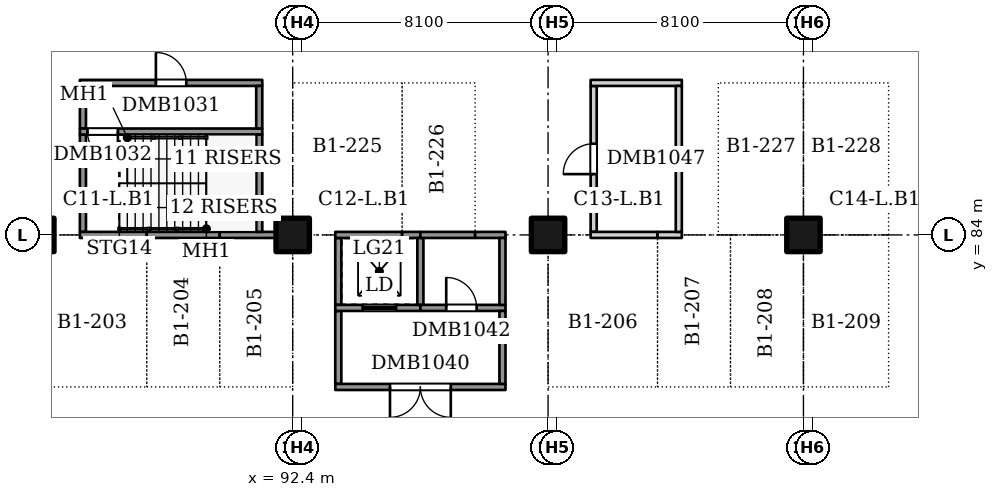
"""IFC4 building model, lengths in metres.
Left out: names, types, materials, properties, quantities, classifications, styles, units other than length and angle.
Written with IfcOpenShell. Run it as: python <this file> out.ifc"""

import sys

from ifc_helpers import new_model, si_unit, direction, frame, frame_2d, origin, origin_2d, place, context, subcontext, project, spatial, rectangle, extrude, element, fill, save


model = new_model("IFC4")
c1 = context("Model", 3, precision=1e-05, world=origin(), true_north=direction((0.0, 1.0)))
c2 = subcontext(c1, "Body", "Model", "MODEL_VIEW")
j1 = project(units=[si_unit("LENGTHUNIT", "METRE"), si_unit("PLANEANGLEUNIT", "RADIAN")], contexts=[c1])
p1 = place(None, origin())
s1 = spatial("IfcSite", under=j1, at=p1, CompositionType="ELEMENT")
p2 = place(p1, origin())
s2 = spatial("IfcBuilding", under=s1, at=p2, CompositionType="ELEMENT")
p3 = place(p2, frame((0.0, 0.0, -4.0)))
s3 = spatial("IfcBuildingStorey", under=s2, at=p3, CompositionType="ELEMENT", Elevation=-4.0)
for number, where, z_axis, x_axis in (
    (1, (84.0, 84.0, 0.0), (0.0, 0.0, 1.0), (1.0, 0.0, 0.0)),
    (2, (92.4, 84.0, 0.0), (0.0, 0.0, 1.0), (1.0, 0.0, 0.0)),
    (3, (100.8, 84.0, 0.0), (0.0, 0.0, 1.0), (1.0, 0.0, 0.0)),
    (4, (109.2, 84.0, 0.0), (0.0, 0.0, 1.0), (1.0, 0.0, 0.0)),
):
    element("IfcColumn", number, at=place(p3, frame(where, z_axis=z_axis, x_axis=x_axis)), inside=s3, PredefinedType="COLUMN", context=c2, shape_type="SweptSolid", body=[
        extrude(rectangle(XDim=1.1, YDim=1.1, at=origin_2d()), origin(), (0.0, 0.0, 1.0), 3.6),
    ])
p4 = place(p3, frame((85.5, 84.1, 0.0), z_axis=(0.0, 0.0, 1.0), x_axis=(0.0, 1.0, 0.0)))
e5 = element("IfcWall", 5, at=p4, inside=s3, PredefinedType="SOLIDWALL", context=c2, shape_type="SweptSolid", body=[
    extrude(rectangle(XDim=3.2, YDim=0.2, at=frame_2d((1.6, 0.0))), origin(), (0.0, 0.0, 1.0), 4.0),
])
p5 = place(p3, frame((85.4, 84.0, 0.0), z_axis=(0.0, 0.0, 1.0), x_axis=(1.0, 0.0, 0.0)))
e6 = element("IfcWall", 6, at=p5, inside=s3, PredefinedType="SOLIDWALL", context=c2, shape_type="SweptSolid", body=[
    extrude(rectangle(XDim=2.2, YDim=0.2, at=frame_2d((1.1, 0.0))), origin(), (0.0, 0.0, 1.0), 4.0),
])
p6 = place(p3, frame((85.5, 87.5, 0.0), z_axis=(0.0, 0.0, 1.0), x_axis=(0.0, 1.0, 0.0)))
e7 = element("IfcWall", 7, at=p6, inside=s3, PredefinedType="SOLIDWALL", context=c2, shape_type="SweptSolid", body=[
    extrude(rectangle(XDim=1.4, YDim=0.2, at=frame_2d((0.7, 0.0))), origin(), (0.0, 0.0, 1.0), 4.0),
])
p7 = place(p3, frame((85.4, 87.4, 0.0), z_axis=(0.0, 0.0, 1.0), x_axis=(1.0, 0.0, 0.0)))
e8 = element("IfcWall", 8, at=p7, inside=s3, PredefinedType="SOLIDWALL", context=c2, shape_type="SweptSolid", body=[
    extrude(rectangle(XDim=6.0, YDim=0.2, at=frame_2d((3.0, 0.0))), origin(), (0.0, 0.0, 1.0), 4.0),
])
p8 = place(p7, frame((0.25, 0.0, 0.0)))
e9 = element("IfcOpeningElement", 9, at=p8, cuts=e8, PredefinedType="OPENING", context=c2, shape_type="SweptSolid", body=[
    extrude(rectangle(XDim=1.0, YDim=2.1, at=frame_2d((0.5, 1.05))), frame((0.0, 0.11, 0.0), z_axis=(0.0, -1.0, 0.0), x_axis=(1.0, 0.0, 0.0)), (0.0, 0.0, 1.0), 0.22),
])
p9 = place(p3, frame((85.4, 89.0, 0.0), z_axis=(0.0, 0.0, 1.0), x_axis=(1.0, 0.0, 0.0)))
e10 = element("IfcWall", 10, at=p9, inside=s3, PredefinedType="SOLIDWALL", context=c2, shape_type="SweptSolid", body=[
    extrude(rectangle(XDim=6.0, YDim=0.2, at=frame_2d((3.0, 0.0))), origin(), (0.0, 0.0, 1.0), 4.0),
])
p10 = place(p9, frame((2.5, 0.0, 0.0)))
e11 = element("IfcOpeningElement", 11, at=p10, cuts=e10, PredefinedType="OPENING", context=c2, shape_type="SweptSolid", body=[
    extrude(rectangle(XDim=1.0, YDim=2.1, at=frame_2d((0.5, 1.05))), frame((0.0, 0.11, 0.0), z_axis=(0.0, -1.0, 0.0), x_axis=(1.0, 0.0, 0.0)), (0.0, 0.0, 1.0), 0.22),
])
p11 = place(p3, frame((87.6, 84.0, 0.0), z_axis=(0.0, 0.0, 1.0), x_axis=(1.0, 0.0, 0.0)))
e12 = element("IfcWall", 12, at=p11, inside=s3, PredefinedType="SOLIDWALL", context=c2, shape_type="SweptSolid", body=[
    extrude(rectangle(XDim=2.4, YDim=0.2, at=frame_2d((1.2, 0.0))), origin(), (0.0, 0.0, 1.0), 4.0),
])
p12 = place(p3, frame((90.0, 84.0, 0.0), z_axis=(0.0, 0.0, 1.0), x_axis=(1.0, 0.0, 0.0)))
e13 = element("IfcWall", 13, at=p12, inside=s3, PredefinedType="SOLIDWALL", context=c2, shape_type="SweptSolid", body=[
    extrude(rectangle(XDim=1.85, YDim=0.2, at=frame_2d((0.925, 0.0))), origin(), (0.0, 0.0, 1.0), 4.0),
])
p13 = place(p3, frame((91.3, 84.1, 0.0), z_axis=(0.0, 0.0, 1.0), x_axis=(0.0, 1.0, 0.0)))
e14 = element("IfcWall", 14, at=p13, inside=s3, PredefinedType="SOLIDWALL", context=c2, shape_type="SweptSolid", body=[
    extrude(rectangle(XDim=3.2, YDim=0.2, at=frame_2d((1.6, 0.0))), origin(), (0.0, 0.0, 1.0), 4.0),
])
p14 = place(p3, frame((91.3, 87.5, 0.0), z_axis=(0.0, 0.0, 1.0), x_axis=(0.0, 1.0, 0.0)))
e15 = element("IfcWall", 15, at=p14, inside=s3, PredefinedType="SOLIDWALL", context=c2, shape_type="SweptSolid", body=[
    extrude(rectangle(XDim=1.4, YDim=0.2, at=frame_2d((0.7, 0.0))), origin(), (0.0, 0.0, 1.0), 4.0),
])
p15 = place(p3, frame((93.9, 79.1, 0.0), z_axis=(0.0, 0.0, 1.0), x_axis=(0.0, 1.0, 0.0)))
e16 = element("IfcWall", 16, at=p15, inside=s3, PredefinedType="SOLIDWALL", context=c2, shape_type="SweptSolid", body=[
    extrude(rectangle(XDim=2.4, YDim=0.2, at=frame_2d((1.2, 0.0))), origin(), (0.0, 0.0, 1.0), 4.0),
])
p16 = place(p3, frame((93.8, 79.0, 0.0), z_axis=(0.0, 0.0, 1.0), x_axis=(1.0, 0.0, 0.0)))
e17 = element("IfcWall", 17, at=p16, inside=s3, PredefinedType="SOLIDWALL", context=c2, shape_type="SweptSolid", body=[
    extrude(rectangle(XDim=5.6, YDim=0.2, at=frame_2d((2.8, 0.0))), origin(), (0.0, 0.0, 1.0), 4.0),
])
p17 = place(p16, frame((1.8, 0.0, 0.0)))
e18 = element("IfcOpeningElement", 18, at=p17, cuts=e17, PredefinedType="OPENING", context=c2, shape_type="SweptSolid", body=[
    extrude(rectangle(XDim=2.0, YDim=2.1, at=frame_2d((1.0, 1.05))), frame((0.0, 0.11, 0.0), z_axis=(0.0, -1.0, 0.0), x_axis=(1.0, 0.0, 0.0)), (0.0, 0.0, 1.0), 0.22),
])
p18 = place(p3, frame((93.9, 81.7, 0.0), z_axis=(0.0, 0.0, 1.0), x_axis=(0.0, 1.0, 0.0)))
e19 = element("IfcWall", 19, at=p18, inside=s3, PredefinedType="SOLIDWALL", context=c2, shape_type="SweptSolid", body=[
    extrude(rectangle(XDim=2.2, YDim=0.2, at=frame_2d((1.1, 0.0))), origin(), (0.0, 0.0, 1.0), 4.0),
])
p19 = place(p3, frame((93.8, 81.6, 0.0), z_axis=(0.0, 0.0, 1.0), x_axis=(1.0, 0.0, 0.0)))
e20 = element("IfcWall", 20, at=p19, inside=s3, PredefinedType="SOLIDWALL", context=c2, shape_type="SweptSolid", body=[
    extrude(rectangle(XDim=2.8, YDim=0.2, at=frame_2d((1.4, 0.0))), origin(), (0.0, 0.0, 1.0), 4.0),
])
p20 = place(p19, frame((0.9, 0.0, 0.0)))
e21 = element("IfcOpeningElement", 21, at=p20, cuts=e20, PredefinedType="OPENING", context=c2, shape_type="SweptSolid", body=[
    extrude(rectangle(XDim=1.1, YDim=2.1, at=frame_2d((0.55, 1.05))), frame((0.0, 0.11, 0.0), z_axis=(0.0, -1.0, 0.0), x_axis=(1.0, 0.0, 0.0)), (0.0, 0.0, 1.0), 0.22),
])
p21 = place(p3, frame((93.8, 84.0, 0.0), z_axis=(0.0, 0.0, 1.0), x_axis=(1.0, 0.0, 0.0)))
e22 = element("IfcWall", 22, at=p21, inside=s3, PredefinedType="SOLIDWALL", context=c2, shape_type="SweptSolid", body=[
    extrude(rectangle(XDim=2.2, YDim=0.2, at=frame_2d((1.1, 0.0))), origin(), (0.0, 0.0, 1.0), 4.0),
])
p22 = place(p3, frame((96.0, 84.0, 0.0), z_axis=(0.0, 0.0, 1.0), x_axis=(1.0, 0.0, 0.0)))
e23 = element("IfcWall", 23, at=p22, inside=s3, PredefinedType="SOLIDWALL", context=c2, shape_type="SweptSolid", body=[
    extrude(rectangle(XDim=0.6, YDim=0.2, at=frame_2d((0.3, 0.0))), origin(), (0.0, 0.0, 1.0), 4.0),
])
p23 = place(p3, frame((96.6, 81.7, 0.0), z_axis=(0.0, 0.0, 1.0), x_axis=(0.0, 1.0, 0.0)))
e24 = element("IfcWall", 24, at=p23, inside=s3, PredefinedType="SOLIDWALL", context=c2, shape_type="SweptSolid", body=[
    extrude(rectangle(XDim=2.2, YDim=0.2, at=frame_2d((1.1, 0.0))), origin(), (0.0, 0.0, 1.0), 4.0),
])
p24 = place(p3, frame((96.6, 81.6, 0.0), z_axis=(0.0, 0.0, 1.0), x_axis=(1.0, 0.0, 0.0)))
e25 = element("IfcWall", 25, at=p24, inside=s3, PredefinedType="SOLIDWALL", context=c2, shape_type="SweptSolid", body=[
    extrude(rectangle(XDim=2.8, YDim=0.2, at=frame_2d((1.4, 0.0))), origin(), (0.0, 0.0, 1.0), 4.0),
])
p25 = place(p24, frame((0.85, 0.0, 0.0)))
e26 = element("IfcOpeningElement", 26, at=p25, cuts=e25, PredefinedType="OPENING", context=c2, shape_type="SweptSolid", body=[
    extrude(rectangle(XDim=1.0, YDim=2.1, at=frame_2d((0.5, 1.05))), frame((0.0, 0.11, 0.0), z_axis=(0.0, -1.0, 0.0), x_axis=(1.0, 0.0, 0.0)), (0.0, 0.0, 1.0), 0.22),
])
p26 = place(p3, frame((96.6, 84.0, 0.0), z_axis=(0.0, 0.0, 1.0), x_axis=(1.0, 0.0, 0.0)))
e27 = element("IfcWall", 27, at=p26, inside=s3, PredefinedType="SOLIDWALL", context=c2, shape_type="SweptSolid", body=[
    extrude(rectangle(XDim=1.8, YDim=0.2, at=frame_2d((0.9, 0.0))), origin(), (0.0, 0.0, 1.0), 4.0),
])
p27 = place(p3, frame((98.4, 84.0, 0.0), z_axis=(0.0, 0.0, 1.0), x_axis=(1.0, 0.0, 0.0)))
e28 = element("IfcWall", 28, at=p27, inside=s3, PredefinedType="SOLIDWALL", context=c2, shape_type="SweptSolid", body=[
    extrude(rectangle(XDim=1.0, YDim=0.2, at=frame_2d((0.5, 0.0))), origin(), (0.0, 0.0, 1.0), 4.0),
])
p28 = place(p3, frame((99.3, 79.1, 0.0), z_axis=(0.0, 0.0, 1.0), x_axis=(0.0, 1.0, 0.0)))
e29 = element("IfcWall", 29, at=p28, inside=s3, PredefinedType="SOLIDWALL", context=c2, shape_type="SweptSolid", body=[
    extrude(rectangle(XDim=2.4, YDim=0.2, at=frame_2d((1.2, 0.0))), origin(), (0.0, 0.0, 1.0), 4.0),
])
p29 = place(p3, frame((99.3, 81.7, 0.0), z_axis=(0.0, 0.0, 1.0), x_axis=(0.0, 1.0, 0.0)))
e30 = element("IfcWall", 30, at=p29, inside=s3, PredefinedType="SOLIDWALL", context=c2, shape_type="SweptSolid", body=[
    extrude(rectangle(XDim=2.2, YDim=0.2, at=frame_2d((1.1, 0.0))), origin(), (0.0, 0.0, 1.0), 4.0),
])
p30 = place(p3, frame((102.3, 84.1, 0.0), z_axis=(0.0, 0.0, 1.0), x_axis=(0.0, 1.0, 0.0)))
e31 = element("IfcWall", 31, at=p30, inside=s3, PredefinedType="PARTITIONING", context=c2, shape_type="SweptSolid", body=[
    extrude(rectangle(XDim=4.8, YDim=0.2, at=frame_2d((2.4, 0.0))), origin(), (0.0, 0.0, 1.0), 3.6),
])
p31 = place(p30, frame((1.9, 0.0, 0.0)))
e32 = element("IfcOpeningElement", 32, at=p31, cuts=e31, PredefinedType="OPENING", context=c2, shape_type="SweptSolid", body=[
    extrude(rectangle(XDim=1.0, YDim=2.1, at=frame_2d((0.5, 1.05))), frame((0.0, 0.11, 0.0), z_axis=(0.0, -1.0, 0.0), x_axis=(1.0, 0.0, 0.0)), (0.0, 0.0, 1.0), 0.22),
])
p32 = place(p3, frame((102.2, 84.0, 0.0), z_axis=(0.0, 0.0, 1.0), x_axis=(1.0, 0.0, 0.0)))
e33 = element("IfcWall", 33, at=p32, inside=s3, PredefinedType="PARTITIONING", context=c2, shape_type="SweptSolid", body=[
    extrude(rectangle(XDim=2.2, YDim=0.2, at=frame_2d((1.1, 0.0))), origin(), (0.0, 0.0, 1.0), 3.6),
])
p33 = place(p3, frame((102.2, 89.0, 0.0), z_axis=(0.0, 0.0, 1.0), x_axis=(1.0, 0.0, 0.0)))
e34 = element("IfcWall", 34, at=p33, inside=s3, PredefinedType="PARTITIONING", context=c2, shape_type="SweptSolid", body=[
    extrude(rectangle(XDim=3.0, YDim=0.2, at=frame_2d((1.5, 0.0))), origin(), (0.0, 0.0, 1.0), 3.6),
])
p34 = place(p3, frame((104.4, 84.0, 0.0), z_axis=(0.0, 0.0, 1.0), x_axis=(1.0, 0.0, 0.0)))
e35 = element("IfcWall", 35, at=p34, inside=s3, PredefinedType="PARTITIONING", context=c2, shape_type="SweptSolid", body=[
    extrude(rectangle(XDim=0.8, YDim=0.2, at=frame_2d((0.4, 0.0))), origin(), (0.0, 0.0, 1.0), 3.6),
])
p35 = place(p3, frame((105.1, 84.1, 0.0), z_axis=(0.0, 0.0, 1.0), x_axis=(0.0, 1.0, 0.0)))
e36 = element("IfcWall", 36, at=p35, inside=s3, PredefinedType="PARTITIONING", context=c2, shape_type="SweptSolid", body=[
    extrude(rectangle(XDim=4.8, YDim=0.2, at=frame_2d((2.4, 0.0))), origin(), (0.0, 0.0, 1.0), 3.6),
])
p36 = place(p10, origin())
e37 = element("IfcDoor", 37, at=p36, inside=s3, OperationType="SINGLE_SWING_LEFT", PredefinedType="DOOR", context=c2, shape_type="SweptSolid", body=[
    extrude(rectangle(XDim=1.0, YDim=2.1, at=frame_2d((0.5, 1.05))), frame((0.0, 0.025, 0.0), z_axis=(0.0, -1.0, 0.0), x_axis=(1.0, 0.0, 0.0)), (0.0, 0.0, 1.0), 0.05),
])
fill(e11, e37)
p37 = place(p8, frame((1.0, 0.0, 0.0), z_axis=(0.0, 0.0, 1.0), x_axis=(-1.0, 0.0, 0.0)))
e38 = element("IfcDoor", 38, at=p37, inside=s3, OperationType="SINGLE_SWING_LEFT", PredefinedType="DOOR", context=c2, shape_type="SweptSolid", body=[
    extrude(rectangle(XDim=1.0, YDim=2.1, at=frame_2d((0.5, 1.05))), frame((0.0, 0.025, 0.0), z_axis=(0.0, -1.0, 0.0), x_axis=(1.0, 0.0, 0.0)), (0.0, 0.0, 1.0), 0.05),
])
fill(e9, e38)
p38 = place(p17, frame((2.0, 0.0, 0.0), z_axis=(0.0, 0.0, 1.0), x_axis=(-1.0, 0.0, 0.0)))
e39 = element("IfcDoor", 39, at=p38, inside=s3, OperationType="DOUBLE_DOOR_SINGLE_SWING", PredefinedType="DOOR", context=c2, shape_type="SweptSolid", body=[
    extrude(rectangle(XDim=2.0, YDim=2.1, at=frame_2d((1.0, 1.05))), frame((0.0, 0.025, 0.0), z_axis=(0.0, -1.0, 0.0), x_axis=(1.0, 0.0, 0.0)), (0.0, 0.0, 1.0), 0.05),
])
fill(e18, e39)
p39 = place(p20, origin())
e40 = element("IfcDoor", 40, at=p39, inside=s3, OperationType="SLIDING_TO_LEFT", PredefinedType="DOOR", context=c2, shape_type="SweptSolid", body=[
    extrude(rectangle(XDim=1.1, YDim=2.1, at=frame_2d((0.55, 1.05))), frame((0.0, 0.025, 0.0), z_axis=(0.0, -1.0, 0.0), x_axis=(1.0, 0.0, 0.0)), (0.0, 0.0, 1.0), 0.05),
])
fill(e21, e40)
p40 = place(p25, origin())
e41 = element("IfcDoor", 41, at=p40, inside=s3, OperationType="SINGLE_SWING_LEFT", PredefinedType="DOOR", context=c2, shape_type="SweptSolid", body=[
    extrude(rectangle(XDim=1.0, YDim=2.1, at=frame_2d((0.5, 1.05))), frame((0.0, 0.025, 0.0), z_axis=(0.0, -1.0, 0.0), x_axis=(1.0, 0.0, 0.0)), (0.0, 0.0, 1.0), 0.05),
])
fill(e26, e41)
p41 = place(p31, origin())
e42 = element("IfcDoor", 42, at=p41, inside=s3, OperationType="SINGLE_SWING_LEFT", PredefinedType="DOOR", context=c2, shape_type="SweptSolid", body=[
    extrude(rectangle(XDim=1.0, YDim=2.1, at=frame_2d((0.5, 1.05))), frame((0.0, 0.025, 0.0), z_axis=(0.0, -1.0, 0.0), x_axis=(1.0, 0.0, 0.0)), (0.0, 0.0, 1.0), 0.05),
])
fill(e32, e42)
save(model, sys.argv[1])
